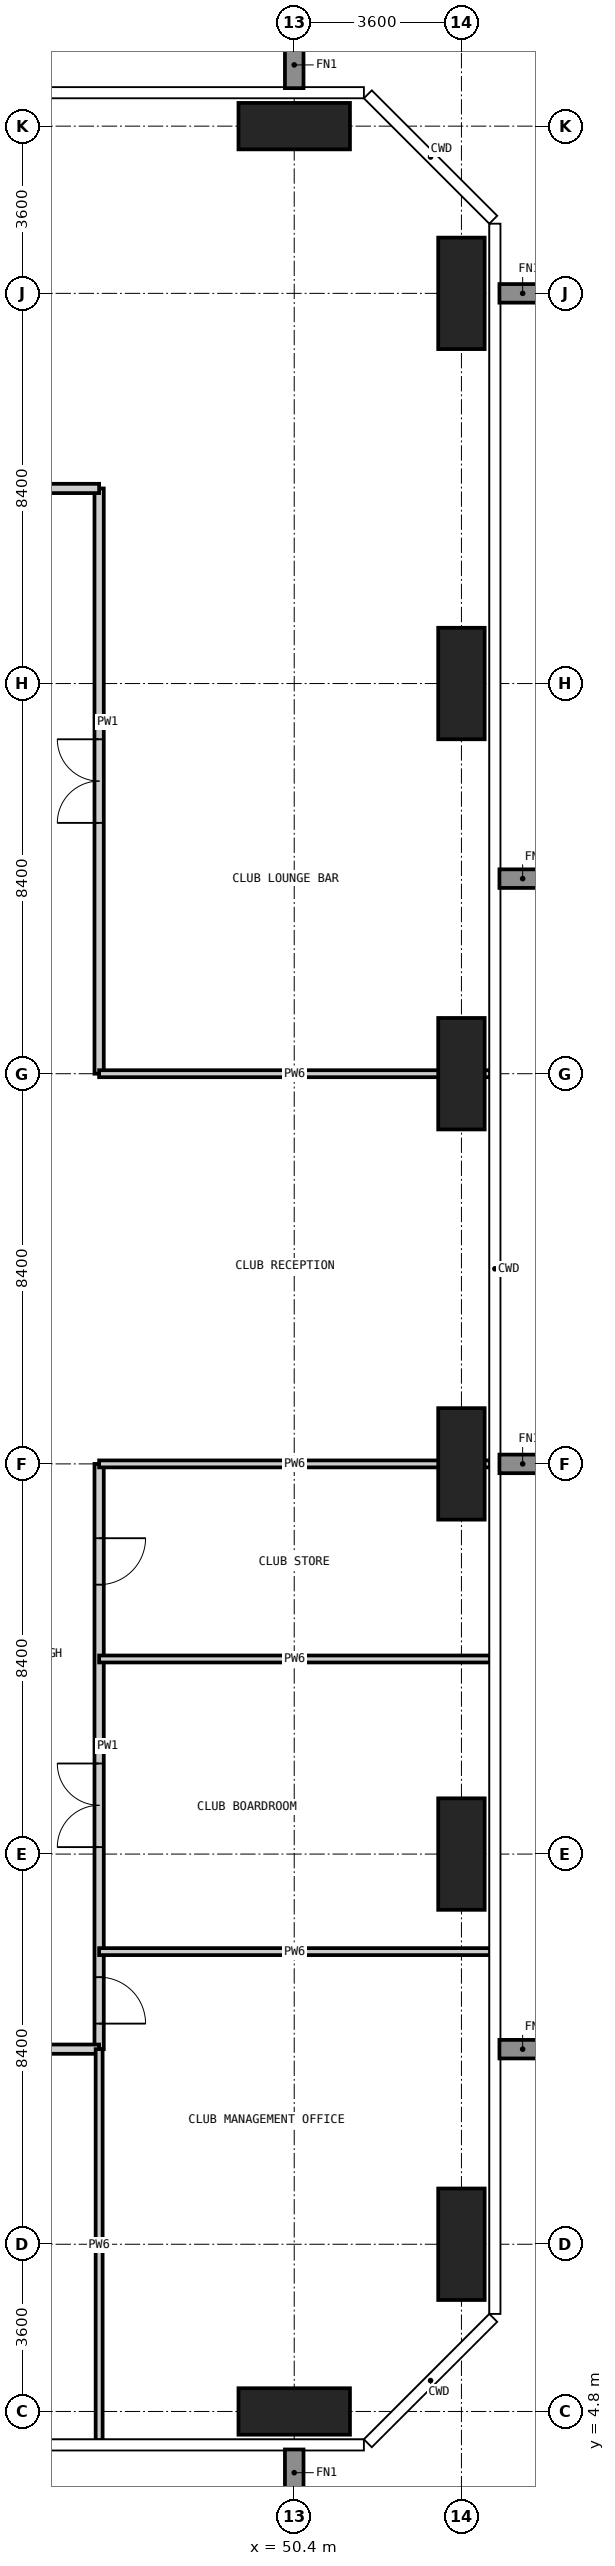
"""IFC4 building model, lengths in metres.
Left out: names, types, materials, properties, quantities, classifications, styles, units other than length and angle.
Written with IfcOpenShell. Run it as: python <this file> out.ifc"""

import sys

from ifc_helpers import new_model, si_unit, direction, frame, frame_2d, origin, origin_2d, place, context, subcontext, project, spatial, rectangle, extrude, element, fill, save


model = new_model("IFC4")
c1 = context("Model", 3, precision=1e-05, world=origin(), true_north=direction((0.0, 1.0)))
c2 = subcontext(c1, "Body", "Model", "MODEL_VIEW")
j1 = project(units=[si_unit("LENGTHUNIT", "METRE"), si_unit("PLANEANGLEUNIT", "RADIAN")], contexts=[c1])
p1 = place(None, origin())
s1 = spatial("IfcSite", under=j1, at=p1, CompositionType="ELEMENT")
p2 = place(p1, origin())
s2 = spatial("IfcBuilding", under=s1, at=p2, CompositionType="ELEMENT")
p3 = place(p2, frame((0.0, 0.0, 284.1)))
s3 = spatial("IfcBuildingStorey", under=s2, at=p3, CompositionType="ELEMENT", Elevation=284.1)
for number, where, z_axis, x_axis in (
    (1, (50.4, 4.8, -0.35), (0.0, 0.0, 1.0), (1.0, 0.0, 0.0)),
    (2, (50.4, 54.0, -0.35), (0.0, 0.0, 1.0), (1.0, 0.0, 0.0)),
):
    element("IfcColumn", number, at=place(p3, frame(where, z_axis=z_axis, x_axis=x_axis)), inside=s3, PredefinedType="COLUMN", context=c2, shape_type="SweptSolid", body=[
        extrude(rectangle(XDim=2.4, YDim=1.0, at=origin_2d()), origin(), (0.0, 0.0, 1.0), 5.0),
    ])
for number, where, z_axis, x_axis in (
    (3, (54.0, 8.4, -0.35), (0.0, 0.0, 1.0), (1.0, 0.0, 0.0)),
    (4, (54.0, 16.8, -0.35), (0.0, 0.0, 1.0), (1.0, 0.0, 0.0)),
    (5, (54.0, 25.2, -0.35), (0.0, 0.0, 1.0), (1.0, 0.0, 0.0)),
    (6, (54.0, 33.6, -0.35), (0.0, 0.0, 1.0), (1.0, 0.0, 0.0)),
    (7, (54.0, 42.0, -0.35), (0.0, 0.0, 1.0), (1.0, 0.0, 0.0)),
    (8, (54.0, 50.4, -0.35), (0.0, 0.0, 1.0), (1.0, 0.0, 0.0)),
):
    element("IfcColumn", number, at=place(p3, frame(where, z_axis=z_axis, x_axis=x_axis)), inside=s3, PredefinedType="COLUMN", context=c2, shape_type="SweptSolid", body=[
        extrude(rectangle(XDim=1.0, YDim=2.4, at=origin_2d()), origin(), (0.0, 0.0, 1.0), 5.0),
    ])
p4 = place(p3, frame((46.2, 12.6, 0.0), z_axis=(0.0, 0.0, 1.0), x_axis=(0.0, 1.0, 0.0)))
e9 = element("IfcWall", 9, at=p4, inside=s3, PredefinedType="PARTITIONING", context=c2, shape_type="SweptSolid", body=[
    extrude(rectangle(XDim=12.6, YDim=0.2, at=frame_2d((6.3, 0.0))), origin(), (0.0, 0.0, 1.0), 4.65),
])
p5 = place(p4, frame((4.35, 0.0, 0.0)))
e10 = element("IfcOpeningElement", 10, at=p5, cuts=e9, PredefinedType="OPENING", context=c2, shape_type="SweptSolid", body=[
    extrude(rectangle(XDim=1.8, YDim=2.4, at=frame_2d((0.9, 1.2))), frame((0.0, 0.11, 0.0), z_axis=(0.0, -1.0, 0.0), x_axis=(1.0, 0.0, 0.0)), (0.0, 0.0, 1.0), 0.22),
])
p6 = place(p4, frame((0.55, 0.0, 0.0)))
e11 = element("IfcOpeningElement", 11, at=p6, cuts=e9, PredefinedType="OPENING", context=c2, shape_type="SweptSolid", body=[
    extrude(rectangle(XDim=1.0, YDim=2.1, at=frame_2d((0.5, 1.05))), frame((0.0, 0.11, 0.0), z_axis=(0.0, -1.0, 0.0), x_axis=(1.0, 0.0, 0.0)), (0.0, 0.0, 1.0), 0.22),
])
p7 = place(p4, frame((10.0, 0.0, 0.0)))
e12 = element("IfcOpeningElement", 12, at=p7, cuts=e9, PredefinedType="OPENING", context=c2, shape_type="SweptSolid", body=[
    extrude(rectangle(XDim=1.0, YDim=2.1, at=frame_2d((0.5, 1.05))), frame((0.0, 0.11, 0.0), z_axis=(0.0, -1.0, 0.0), x_axis=(1.0, 0.0, 0.0)), (0.0, 0.0, 1.0), 0.22),
])
p8 = place(p3, frame((46.2, 33.6, 0.0), z_axis=(0.0, 0.0, 1.0), x_axis=(0.0, 1.0, 0.0)))
e13 = element("IfcWall", 13, at=p8, inside=s3, PredefinedType="PARTITIONING", context=c2, shape_type="SweptSolid", body=[
    extrude(rectangle(XDim=12.6, YDim=0.2, at=frame_2d((6.3, 0.0))), origin(), (0.0, 0.0, 1.0), 4.65),
])
p9 = place(p8, frame((5.4, 0.0, 0.0)))
e14 = element("IfcOpeningElement", 14, at=p9, cuts=e13, PredefinedType="OPENING", context=c2, shape_type="SweptSolid", body=[
    extrude(rectangle(XDim=1.8, YDim=2.4, at=frame_2d((0.9, 1.2))), frame((0.0, 0.11, 0.0), z_axis=(0.0, -1.0, 0.0), x_axis=(1.0, 0.0, 0.0)), (0.0, 0.0, 1.0), 0.22),
])
p10 = place(p3, frame((21.0, 12.6, 0.0), z_axis=(0.0, 0.0, 1.0), x_axis=(1.0, 0.0, 0.0)))
e15 = element("IfcWall", 15, at=p10, inside=s3, PredefinedType="PARTITIONING", context=c2, shape_type="SweptSolid", body=[
    extrude(rectangle(XDim=25.2, YDim=0.2, at=frame_2d((12.6, 0.0))), origin(), (0.0, 0.0, 1.0), 4.65),
])
p11 = place(p10, frame((5.4, 0.0, 0.0)))
e16 = element("IfcOpeningElement", 16, at=p11, cuts=e15, PredefinedType="OPENING", context=c2, shape_type="SweptSolid", body=[
    extrude(rectangle(XDim=1.8, YDim=2.4, at=frame_2d((0.9, 1.2))), frame((0.0, 0.11, 0.0), z_axis=(0.0, -1.0, 0.0), x_axis=(1.0, 0.0, 0.0)), (0.0, 0.0, 1.0), 0.22),
])
p12 = place(p10, frame((18.4, 0.0, 0.0)))
e17 = element("IfcOpeningElement", 17, at=p12, cuts=e15, PredefinedType="OPENING", context=c2, shape_type="SweptSolid", body=[
    extrude(rectangle(XDim=1.0, YDim=2.1, at=frame_2d((0.5, 1.05))), frame((0.0, 0.11, 0.0), z_axis=(0.0, -1.0, 0.0), x_axis=(1.0, 0.0, 0.0)), (0.0, 0.0, 1.0), 0.22),
])
p13 = place(p3, frame((46.2, 46.2, 0.0), z_axis=(0.0, 0.0, 1.0), x_axis=(-1.0, 0.0, 0.0)))
e18 = element("IfcWall", 18, at=p13, inside=s3, PredefinedType="PARTITIONING", context=c2, shape_type="SweptSolid", body=[
    extrude(rectangle(XDim=11.4, YDim=0.2, at=frame_2d((5.7, 0.0))), origin(), (0.0, 0.0, 1.0), 4.65),
])
p14 = place(p13, frame((4.8, 0.0, 0.0)))
e19 = element("IfcOpeningElement", 19, at=p14, cuts=e18, PredefinedType="OPENING", context=c2, shape_type="SweptSolid", body=[
    extrude(rectangle(XDim=1.8, YDim=2.4, at=frame_2d((0.9, 1.2))), frame((0.0, 0.11, 0.0), z_axis=(0.0, -1.0, 0.0), x_axis=(1.0, 0.0, 0.0)), (0.0, 0.0, 1.0), 0.22),
])
p15 = place(p3, frame((46.2, 4.182, 0.0), z_axis=(0.0, 0.0, 1.0), x_axis=(0.0, 1.0, 0.0)))
e20 = element("IfcWall", 20, at=p15, inside=s3, PredefinedType="PARTITIONING", context=c2, shape_type="SweptSolid", body=[
    extrude(rectangle(XDim=8.418, YDim=0.15, at=frame_2d((4.209, 0.0))), origin(), (0.0, 0.0, 1.0), 4.65),
])
for number, where, z_axis, x_axis in (
    (21, (46.2, 14.7, 0.0), (0.0, 0.0, 1.0), (1.0, 0.0, 0.0)),
    (22, (46.2, 21.0, 0.0), (0.0, 0.0, 1.0), (1.0, 0.0, 0.0)),
    (23, (46.2, 25.2, 0.0), (0.0, 0.0, 1.0), (1.0, 0.0, 0.0)),
    (24, (46.2, 33.6, 0.0), (0.0, 0.0, 1.0), (1.0, 0.0, 0.0)),
):
    element("IfcWall", number, at=place(p3, frame(where, z_axis=z_axis, x_axis=x_axis)), inside=s3, PredefinedType="PARTITIONING", context=c2, shape_type="SweptSolid", body=[
        extrude(rectangle(XDim=8.418, YDim=0.15, at=frame_2d((4.209, 0.0))), origin(), (0.0, 0.0, 1.0), 4.65),
    ])
p16 = place(p9, origin())
e25 = element("IfcDoor", 25, at=p16, inside=s3, OperationType="DOUBLE_DOOR_DOUBLE_SWING", PredefinedType="DOOR", context=c2, shape_type="SweptSolid", body=[
    extrude(rectangle(XDim=1.8, YDim=2.4, at=frame_2d((0.9, 1.2))), frame((0.0, 0.025, 0.0), z_axis=(0.0, -1.0, 0.0), x_axis=(1.0, 0.0, 0.0)), (0.0, 0.0, 1.0), 0.05),
])
fill(e14, e25)
p17 = place(p5, origin())
e26 = element("IfcDoor", 26, at=p17, inside=s3, OperationType="DOUBLE_DOOR_DOUBLE_SWING", PredefinedType="DOOR", context=c2, shape_type="SweptSolid", body=[
    extrude(rectangle(XDim=1.8, YDim=2.4, at=frame_2d((0.9, 1.2))), frame((0.0, 0.025, 0.0), z_axis=(0.0, -1.0, 0.0), x_axis=(1.0, 0.0, 0.0)), (0.0, 0.0, 1.0), 0.05),
])
fill(e10, e26)
p18 = place(p6, frame((1.0, 0.0, 0.0), z_axis=(0.0, 0.0, 1.0), x_axis=(-1.0, 0.0, 0.0)))
e27 = element("IfcDoor", 27, at=p18, inside=s3, OperationType="SINGLE_SWING_RIGHT", PredefinedType="DOOR", context=c2, shape_type="SweptSolid", body=[
    extrude(rectangle(XDim=1.0, YDim=2.1, at=frame_2d((0.5, 1.05))), frame((0.0, 0.025, 0.0), z_axis=(0.0, -1.0, 0.0), x_axis=(1.0, 0.0, 0.0)), (0.0, 0.0, 1.0), 0.05),
])
fill(e11, e27)
p19 = place(p7, frame((1.0, 0.0, 0.0), z_axis=(0.0, 0.0, 1.0), x_axis=(-1.0, 0.0, 0.0)))
e28 = element("IfcDoor", 28, at=p19, inside=s3, OperationType="SINGLE_SWING_LEFT", PredefinedType="DOOR", context=c2, shape_type="SweptSolid", body=[
    extrude(rectangle(XDim=1.0, YDim=2.1, at=frame_2d((0.5, 1.05))), frame((0.0, 0.025, 0.0), z_axis=(0.0, -1.0, 0.0), x_axis=(1.0, 0.0, 0.0)), (0.0, 0.0, 1.0), 0.05),
])
fill(e12, e28)
save(model, sys.argv[1])
